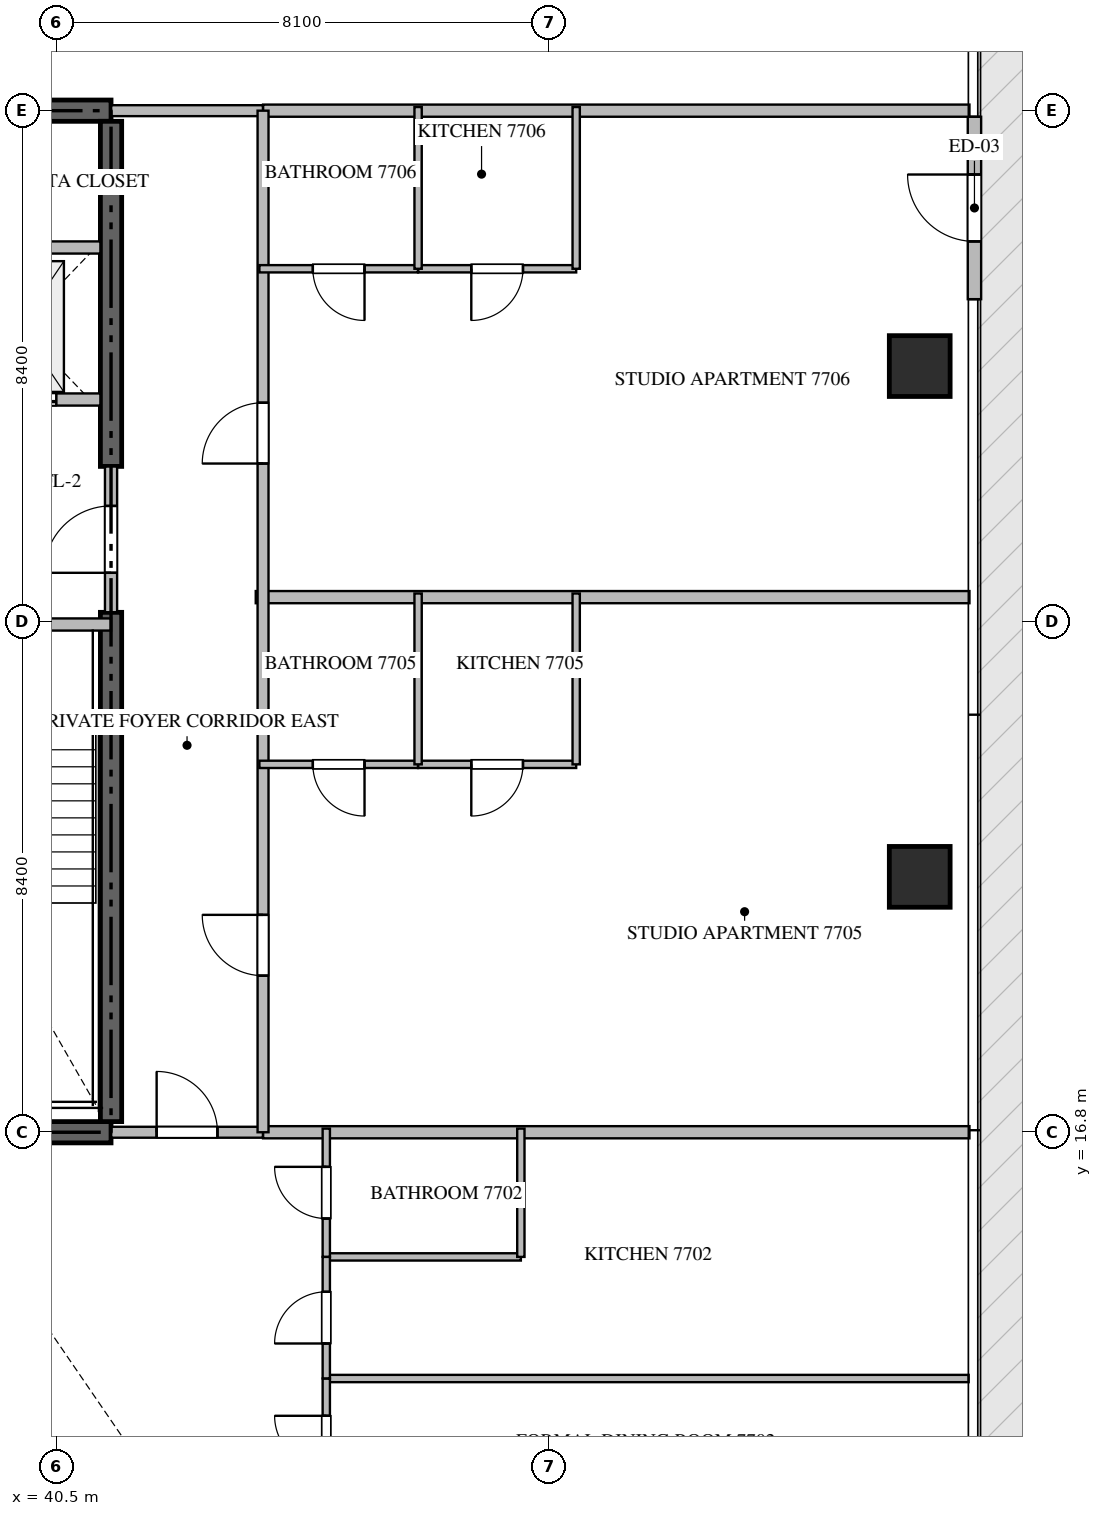
"""IFC4 building model, lengths in metres.
Left out: names, types, materials, properties, quantities, classifications, styles, units other than length and angle.
Written with IfcOpenShell. Run it as: python <this file> out.ifc"""

import sys

from ifc_helpers import new_model, si_unit, direction, frame, frame_2d, origin, origin_2d, place, context, subcontext, project, spatial, rectangle, extrude, source, transform, mapped, element, fill, save


model = new_model("IFC4")
c1 = context("Model", 3, precision=1e-05, world=origin(), true_north=direction((0.0, 1.0)))
c2 = subcontext(c1, "Body", "Model", "MODEL_VIEW")
j1 = project(units=[si_unit("LENGTHUNIT", "METRE"), si_unit("PLANEANGLEUNIT", "RADIAN")], contexts=[c1])
p1 = place(None, origin())
s1 = spatial("IfcSite", under=j1, at=p1, CompositionType="ELEMENT")
p2 = place(p1, origin())
s2 = spatial("IfcBuilding", under=s1, at=p2, CompositionType="ELEMENT")
p3 = place(p2, frame((0.0, 0.0, 309.65)))
s3 = spatial("IfcBuildingStorey", under=s2, at=p3, CompositionType="ELEMENT", Elevation=309.65)
for number, where, z_axis, x_axis in (
    (1, (23.4, 16.8, -0.26), (0.0, 0.0, 1.0), (1.0, 0.0, 0.0)),
    (2, (41.4, 33.6, -0.26), (0.0, 0.0, 1.0), (-1.0, 0.0, 0.0)),
):
    element("IfcWall", number, at=place(p3, frame(where, z_axis=z_axis, x_axis=x_axis)), inside=s3, PredefinedType="SHEAR", context=c2, shape_type="SweptSolid", body=[
        extrude(rectangle(XDim=18.0, YDim=0.35, at=frame_2d((9.0, 0.0))), origin(), (0.0, 0.0, 1.0), 4.048),
    ])
p4 = place(p3, frame((41.4, 16.975, -0.26), z_axis=(0.0, 0.0, 1.0), x_axis=(0.0, 1.0, 0.0)))
e3 = element("IfcWall", 3, at=p4, inside=s3, PredefinedType="SHEAR", context=c2, shape_type="SweptSolid", body=[
    extrude(rectangle(XDim=8.375, YDim=0.35, at=frame_2d((4.188, 0.0))), origin(), (0.0, 0.0, 1.0), 4.048),
])
p5 = place(p3, frame((41.4, 27.75, -0.26), z_axis=(0.0, 0.0, 1.0), x_axis=(0.0, 1.0, 0.0)))
e4 = element("IfcWall", 4, at=p5, inside=s3, PredefinedType="SHEAR", context=c2, shape_type="SweptSolid", body=[
    extrude(rectangle(XDim=5.675, YDim=0.35, at=frame_2d((2.837, 0.0))), origin(), (0.0, 0.0, 1.0), 4.048),
])
m1 = source(origin(), c2, "Body", "SweptSolid", [
    extrude(rectangle(XDim=1.0, YDim=1.0, at=origin_2d()), origin(), (0.0, 0.0, 1.0), 4.05),
])
for number, where, z_axis, x_axis in (
    (5, (54.7, 21.0, -0.26), (0.0, 0.0, 1.0), (1.0, 0.0, 0.0)),
    (6, (54.7, 29.4, -0.26), (0.0, 0.0, 1.0), (1.0, 0.0, 0.0)),
):
    element("IfcColumn", number, at=place(p3, frame(where, z_axis=z_axis, x_axis=x_axis)), inside=s3, PredefinedType="COLUMN", context=c2, shape_type="MappedRepresentation", body=[
        mapped(m1, transform((0.0, 0.0, 0.0), scale=1.0)),
    ])
p6 = place(p3, frame((55.6, 30.5, 0.0), z_axis=(0.0, 0.0, 1.0), x_axis=(0.0, 1.0, 0.0)))
e7 = element("IfcWall", 7, at=p6, inside=s3, PredefinedType="ELEMENTEDWALL", context=c2, shape_type="SweptSolid", body=[
    extrude(rectangle(XDim=3.0, YDim=0.22, at=frame_2d((1.5, 0.0))), origin(), (0.0, 0.0, 1.0), 3.775),
])
p7 = place(p6, frame((0.95, 0.0, 0.0)))
e8 = element("IfcOpeningElement", 8, at=p7, cuts=e7, PredefinedType="OPENING", context=c2, shape_type="SweptSolid", body=[
    extrude(rectangle(XDim=1.1, YDim=2.2, at=frame_2d((0.55, 1.1))), frame((0.0, 0.12, 0.0), z_axis=(0.0, -1.0, 0.0), x_axis=(1.0, 0.0, 0.0)), (0.0, 0.0, 1.0), 0.24),
])
p8 = place(p3, frame((36.95, 25.15, 0.0), z_axis=(0.0, 0.0, 1.0), x_axis=(1.0, 0.0, 0.0)))
e9 = element("IfcWall", 9, at=p8, inside=s3, PredefinedType="STANDARD", context=c2, shape_type="SweptSolid", body=[
    extrude(rectangle(XDim=4.45, YDim=0.2, at=frame_2d((2.225, 0.0))), origin(), (0.0, 0.0, 1.0), 3.79),
])
p9 = place(p8, frame((1.65, 0.0, 0.0)))
e10 = element("IfcOpeningElement", 10, at=p9, cuts=e9, PredefinedType="OPENING", context=c2, shape_type="SweptSolid", body=[
    extrude(rectangle(XDim=1.1, YDim=2.15, at=frame_2d((0.55, 1.075))), frame((0.0, 0.11, 0.0), z_axis=(0.0, -1.0, 0.0), x_axis=(1.0, 0.0, 0.0)), (0.0, 0.0, 1.0), 0.22),
])
p10 = place(p3, frame((38.75, 28.85, 0.0), z_axis=(0.0, 0.0, 1.0), x_axis=(1.0, 0.0, 0.0)))
e11 = element("IfcWall", 11, at=p10, inside=s3, PredefinedType="STANDARD", context=c2, shape_type="SweptSolid", body=[
    extrude(rectangle(XDim=2.475, YDim=0.2, at=frame_2d((1.238, 0.0))), origin(), (0.0, 0.0, 1.0), 3.79),
])
p11 = place(p10, frame((0.55, 0.0, 0.0)))
e12 = element("IfcOpeningElement", 12, at=p11, cuts=e11, PredefinedType="OPENING", context=c2, shape_type="SweptSolid", body=[
    extrude(rectangle(XDim=1.2, YDim=2.2, at=frame_2d((0.6, 1.1))), frame((0.0, 0.11, 0.0), z_axis=(0.0, -1.0, 0.0), x_axis=(1.0, 0.0, 0.0)), (0.0, 0.0, 1.0), 0.22),
])
p12 = place(p3, frame((38.75, 31.35, 0.0), z_axis=(0.0, 0.0, 1.0), x_axis=(1.0, 0.0, 0.0)))
e13 = element("IfcWall", 13, at=p12, inside=s3, PredefinedType="STANDARD", context=c2, shape_type="SweptSolid", body=[
    extrude(rectangle(XDim=2.475, YDim=0.2, at=frame_2d((1.238, 0.0))), origin(), (0.0, 0.0, 1.0), 3.79),
])
p13 = place(p3, frame((41.4, 25.352, 0.0), z_axis=(0.0, 0.0, 1.0), x_axis=(0.0, 1.0, 0.0)))
e14 = element("IfcWall", 14, at=p13, inside=s3, PredefinedType="STANDARD", context=c2, shape_type="SweptSolid", body=[
    extrude(rectangle(XDim=2.396, YDim=0.2, at=frame_2d((1.198, 0.0))), origin(), (0.0, 0.0, 1.0), 3.79),
])
p14 = place(p13, frame((0.648, 0.0, 0.0)))
e15 = element("IfcOpeningElement", 15, at=p14, cuts=e14, PredefinedType="OPENING", context=c2, shape_type="SweptSolid", body=[
    extrude(rectangle(XDim=1.1, YDim=2.15, at=frame_2d((0.55, 1.075))), frame((0.0, 0.11, 0.0), z_axis=(0.0, -1.0, 0.0), x_axis=(1.0, 0.0, 0.0)), (0.0, 0.0, 1.0), 0.22),
])
p15 = place(p3, frame((43.78, 25.6, 0.0), z_axis=(0.0, 0.0, 1.0), x_axis=(1.0, 0.0, 0.0)))
e16 = element("IfcWall", 16, at=p15, inside=s3, PredefinedType="PARTITIONING", context=c2, shape_type="SweptSolid", body=[
    extrude(rectangle(XDim=11.738, YDim=0.2, at=frame_2d((5.869, 0.0))), origin(), (0.0, 0.0, 1.0), 3.79),
])
for number, where, z_axis, x_axis in (
    (17, (43.9, 16.8, 0.0), (0.0, 0.0, 1.0), (1.0, 0.0, 0.0)),
    (18, (43.9, 33.6, 0.0), (0.0, 0.0, 1.0), (1.0, 0.0, 0.0)),
):
    element("IfcWall", number, at=place(p3, frame(where, z_axis=z_axis, x_axis=x_axis)), inside=s3, PredefinedType="PARTITIONING", context=c2, shape_type="SweptSolid", body=[
        extrude(rectangle(XDim=11.618, YDim=0.2, at=frame_2d((5.809, 0.0))), origin(), (0.0, 0.0, 1.0), 3.79),
    ])
p16 = place(p3, frame((41.402, 16.8, 0.0), z_axis=(0.0, 0.0, 1.0), x_axis=(1.0, 0.0, 0.0)))
e19 = element("IfcWall", 19, at=p16, inside=s3, PredefinedType="PARTITIONING", context=c2, shape_type="SweptSolid", body=[
    extrude(rectangle(XDim=2.496, YDim=0.18, at=frame_2d((1.248, 0.0))), origin(), (0.0, 0.0, 1.0), 3.79),
])
p17 = place(p16, frame((0.748, 0.0, 0.0)))
e20 = element("IfcOpeningElement", 20, at=p17, cuts=e19, PredefinedType="OPENING", context=c2, shape_type="SweptSolid", body=[
    extrude(rectangle(XDim=1.0, YDim=2.15, at=frame_2d((0.5, 1.075))), frame((0.0, 0.1, 0.0), z_axis=(0.0, -1.0, 0.0), x_axis=(1.0, 0.0, 0.0)), (0.0, 0.0, 1.0), 0.2),
])
p18 = place(p3, frame((41.402, 33.6, 0.0), z_axis=(0.0, 0.0, 1.0), x_axis=(1.0, 0.0, 0.0)))
e21 = element("IfcWall", 21, at=p18, inside=s3, PredefinedType="PARTITIONING", context=c2, shape_type="SweptSolid", body=[
    extrude(rectangle(XDim=2.496, YDim=0.18, at=frame_2d((1.248, 0.0))), origin(), (0.0, 0.0, 1.0), 3.79),
])
p19 = place(p3, frame((43.9, 16.8, 0.0), z_axis=(0.0, 0.0, 1.0), x_axis=(0.0, 1.0, 0.0)))
e22 = element("IfcWall", 22, at=p19, inside=s3, PredefinedType="PARTITIONING", context=c2, shape_type="SweptSolid", body=[
    extrude(rectangle(XDim=16.8, YDim=0.18, at=frame_2d((8.4, 0.0))), origin(), (0.0, 0.0, 1.0), 3.79),
])
p20 = place(p19, frame((2.575, 0.0, 0.0)))
e23 = element("IfcOpeningElement", 23, at=p20, cuts=e22, PredefinedType="OPENING", context=c2, shape_type="SweptSolid", body=[
    extrude(rectangle(XDim=1.0, YDim=2.15, at=frame_2d((0.5, 1.075))), frame((0.0, 0.1, 0.0), z_axis=(0.0, -1.0, 0.0), x_axis=(1.0, 0.0, 0.0)), (0.0, 0.0, 1.0), 0.2),
])
p21 = place(p19, frame((10.997, 0.0, 0.0)))
e24 = element("IfcOpeningElement", 24, at=p21, cuts=e22, PredefinedType="OPENING", context=c2, shape_type="SweptSolid", body=[
    extrude(rectangle(XDim=1.0, YDim=2.15, at=frame_2d((0.5, 1.075))), frame((0.0, 0.1, 0.0), z_axis=(0.0, -1.0, 0.0), x_axis=(1.0, 0.0, 0.0)), (0.0, 0.0, 1.0), 0.2),
])
p22 = place(p3, frame((44.94, 12.75, 0.0), z_axis=(0.0, 0.0, 1.0), x_axis=(1.0, 0.0, 0.0)))
e25 = element("IfcWall", 25, at=p22, inside=s3, PredefinedType="PARTITIONING", context=c2, shape_type="SweptSolid", body=[
    extrude(rectangle(XDim=10.565, YDim=0.12, at=frame_2d((5.282, 0.0))), origin(), (0.0, 0.0, 1.0), 3.79),
])
p23 = place(p3, frame((44.94, 14.75, 0.0), z_axis=(0.0, 0.0, 1.0), x_axis=(1.0, 0.0, 0.0)))
e26 = element("IfcWall", 26, at=p23, inside=s3, PredefinedType="PARTITIONING", context=c2, shape_type="SweptSolid", body=[
    extrude(rectangle(XDim=3.2, YDim=0.12, at=frame_2d((1.6, 0.0))), origin(), (0.0, 0.0, 1.0), 3.79),
])
p24 = place(p3, frame((48.14, 14.75, 0.0), z_axis=(0.0, 0.0, 1.0), x_axis=(0.0, 1.0, 0.0)))
e27 = element("IfcWall", 27, at=p24, inside=s3, PredefinedType="PARTITIONING", context=c2, shape_type="SweptSolid", body=[
    extrude(rectangle(XDim=2.11, YDim=0.12, at=frame_2d((1.055, 0.0))), origin(), (0.0, 0.0, 1.0), 3.79),
])
p25 = place(p3, frame((44.94, 10.674, 0.0), z_axis=(0.0, 0.0, 1.0), x_axis=(0.0, 1.0, 0.0)))
e28 = element("IfcWall", 28, at=p25, inside=s3, PredefinedType="PARTITIONING", context=c2, shape_type="SweptSolid", body=[
    extrude(rectangle(XDim=2.076, YDim=0.12, at=frame_2d((1.038, 0.0))), origin(), (0.0, 0.0, 1.0), 3.79),
])
p26 = place(p25, frame((0.613, 0.0, 0.0)))
e29 = element("IfcOpeningElement", 29, at=p26, cuts=e28, PredefinedType="OPENING", context=c2, shape_type="SweptSolid", body=[
    extrude(rectangle(XDim=0.85, YDim=2.1, at=frame_2d((0.425, 1.05))), frame((0.0, 0.07, 0.0), z_axis=(0.0, -1.0, 0.0), x_axis=(1.0, 0.0, 0.0)), (0.0, 0.0, 1.0), 0.14),
])
p27 = place(p3, frame((44.94, 12.752, 0.0), z_axis=(0.0, 0.0, 1.0), x_axis=(0.0, 1.0, 0.0)))
e30 = element("IfcWall", 30, at=p27, inside=s3, PredefinedType="PARTITIONING", context=c2, shape_type="SweptSolid", body=[
    extrude(rectangle(XDim=1.998, YDim=0.12, at=frame_2d((0.999, 0.0))), origin(), (0.0, 0.0, 1.0), 3.79),
])
p28 = place(p27, frame((0.574, 0.0, 0.0)))
e31 = element("IfcOpeningElement", 31, at=p28, cuts=e30, PredefinedType="OPENING", context=c2, shape_type="SweptSolid", body=[
    extrude(rectangle(XDim=0.85, YDim=2.1, at=frame_2d((0.425, 1.05))), frame((0.0, 0.07, 0.0), z_axis=(0.0, -1.0, 0.0), x_axis=(1.0, 0.0, 0.0)), (0.0, 0.0, 1.0), 0.14),
])
p29 = place(p3, frame((44.94, 14.752, 0.0), z_axis=(0.0, 0.0, 1.0), x_axis=(0.0, 1.0, 0.0)))
e32 = element("IfcWall", 32, at=p29, inside=s3, PredefinedType="PARTITIONING", context=c2, shape_type="SweptSolid", body=[
    extrude(rectangle(XDim=2.108, YDim=0.12, at=frame_2d((1.054, 0.0))), origin(), (0.0, 0.0, 1.0), 3.79),
])
p30 = place(p29, frame((0.629, 0.0, 0.0)))
e33 = element("IfcOpeningElement", 33, at=p30, cuts=e32, PredefinedType="OPENING", context=c2, shape_type="SweptSolid", body=[
    extrude(rectangle(XDim=0.85, YDim=2.1, at=frame_2d((0.425, 1.05))), frame((0.0, 0.07, 0.0), z_axis=(0.0, -1.0, 0.0), x_axis=(1.0, 0.0, 0.0)), (0.0, 0.0, 1.0), 0.14),
])
p31 = place(p3, frame((49.05, 22.85, 0.0), z_axis=(0.0, 0.0, 1.0), x_axis=(-1.0, 0.0, 0.0)))
e34 = element("IfcWall", 34, at=p31, inside=s3, PredefinedType="PARTITIONING", context=c2, shape_type="SweptSolid", body=[
    extrude(rectangle(XDim=2.6, YDim=0.12, at=frame_2d((1.3, 0.0))), origin(), (0.0, 0.0, 1.0), 3.79),
])
p32 = place(p31, frame((0.875, 0.0, 0.0)))
e35 = element("IfcOpeningElement", 35, at=p32, cuts=e34, PredefinedType="OPENING", context=c2, shape_type="SweptSolid", body=[
    extrude(rectangle(XDim=0.85, YDim=2.1, at=frame_2d((0.425, 1.05))), frame((0.0, 0.07, 0.0), z_axis=(0.0, -1.0, 0.0), x_axis=(1.0, 0.0, 0.0)), (0.0, 0.0, 1.0), 0.14),
])
p33 = place(p3, frame((46.448, 22.85, 0.0), z_axis=(0.0, 0.0, 1.0), x_axis=(-1.0, 0.0, 0.0)))
e36 = element("IfcWall", 36, at=p33, inside=s3, PredefinedType="PARTITIONING", context=c2, shape_type="SweptSolid", body=[
    extrude(rectangle(XDim=2.608, YDim=0.12, at=frame_2d((1.304, 0.0))), origin(), (0.0, 0.0, 1.0), 3.79),
])
p34 = place(p33, frame((0.879, 0.0, 0.0)))
e37 = element("IfcOpeningElement", 37, at=p34, cuts=e36, PredefinedType="OPENING", context=c2, shape_type="SweptSolid", body=[
    extrude(rectangle(XDim=0.85, YDim=2.1, at=frame_2d((0.425, 1.05))), frame((0.0, 0.07, 0.0), z_axis=(0.0, -1.0, 0.0), x_axis=(1.0, 0.0, 0.0)), (0.0, 0.0, 1.0), 0.14),
])
for number, where, z_axis, x_axis in (
    (38, (46.45, 22.85, 0.0), (0.0, 0.0, 1.0), (0.0, 1.0, 0.0)),
    (39, (49.05, 22.85, 0.0), (0.0, 0.0, 1.0), (0.0, 1.0, 0.0)),
):
    element("IfcWall", number, at=place(p3, frame(where, z_axis=z_axis, x_axis=x_axis)), inside=s3, PredefinedType="PARTITIONING", context=c2, shape_type="SweptSolid", body=[
        extrude(rectangle(XDim=2.81, YDim=0.12, at=frame_2d((1.405, 0.0))), origin(), (0.0, 0.0, 1.0), 3.79),
    ])
p35 = place(p3, frame((49.05, 31.0, 0.0), z_axis=(0.0, 0.0, 1.0), x_axis=(-1.0, 0.0, 0.0)))
e40 = element("IfcWall", 40, at=p35, inside=s3, PredefinedType="PARTITIONING", context=c2, shape_type="SweptSolid", body=[
    extrude(rectangle(XDim=2.6, YDim=0.12, at=frame_2d((1.3, 0.0))), origin(), (0.0, 0.0, 1.0), 3.79),
])
p36 = place(p35, frame((0.875, 0.0, 0.0)))
e41 = element("IfcOpeningElement", 41, at=p36, cuts=e40, PredefinedType="OPENING", context=c2, shape_type="SweptSolid", body=[
    extrude(rectangle(XDim=0.85, YDim=2.1, at=frame_2d((0.425, 1.05))), frame((0.0, 0.07, 0.0), z_axis=(0.0, -1.0, 0.0), x_axis=(1.0, 0.0, 0.0)), (0.0, 0.0, 1.0), 0.14),
])
p37 = place(p3, frame((46.448, 31.0, 0.0), z_axis=(0.0, 0.0, 1.0), x_axis=(-1.0, 0.0, 0.0)))
e42 = element("IfcWall", 42, at=p37, inside=s3, PredefinedType="PARTITIONING", context=c2, shape_type="SweptSolid", body=[
    extrude(rectangle(XDim=2.608, YDim=0.12, at=frame_2d((1.304, 0.0))), origin(), (0.0, 0.0, 1.0), 3.79),
])
p38 = place(p37, frame((0.879, 0.0, 0.0)))
e43 = element("IfcOpeningElement", 43, at=p38, cuts=e42, PredefinedType="OPENING", context=c2, shape_type="SweptSolid", body=[
    extrude(rectangle(XDim=0.85, YDim=2.1, at=frame_2d((0.425, 1.05))), frame((0.0, 0.07, 0.0), z_axis=(0.0, -1.0, 0.0), x_axis=(1.0, 0.0, 0.0)), (0.0, 0.0, 1.0), 0.14),
])
for number, where, z_axis, x_axis in (
    (44, (46.45, 31.0, 0.0), (0.0, 0.0, 1.0), (0.0, 1.0, 0.0)),
    (45, (49.05, 31.0, 0.0), (0.0, 0.0, 1.0), (0.0, 1.0, 0.0)),
):
    element("IfcWall", number, at=place(p3, frame(where, z_axis=z_axis, x_axis=x_axis)), inside=s3, PredefinedType="PARTITIONING", context=c2, shape_type="SweptSolid", body=[
        extrude(rectangle(XDim=2.66, YDim=0.12, at=frame_2d((1.33, 0.0))), origin(), (0.0, 0.0, 1.0), 3.79),
    ])
m2 = source(origin(), c2, "Body", "SweptSolid", [
    extrude(rectangle(XDim=1.1, YDim=2.2, at=frame_2d((0.55, 1.1))), frame((0.0, 0.025, 0.0), z_axis=(0.0, -1.0, 0.0), x_axis=(1.0, 0.0, 0.0)), (0.0, 0.0, 1.0), 0.05),
])
p39 = place(p7, origin())
e46 = element("IfcDoor", 46, at=p39, inside=s3, OperationType="SINGLE_SWING_RIGHT", PredefinedType="DOOR", context=c2, shape_type="MappedRepresentation", body=[
    mapped(m2, transform((0.0, 0.0, 0.0), scale=1.0)),
])
fill(e8, e46)
m3 = source(origin(), c2, "Body", "SweptSolid", [
    extrude(rectangle(XDim=1.2, YDim=2.2, at=frame_2d((0.6, 1.1))), frame((0.0, 0.025, 0.0), z_axis=(0.0, -1.0, 0.0), x_axis=(1.0, 0.0, 0.0)), (0.0, 0.0, 1.0), 0.05),
])
p40 = place(p11, origin())
e47 = element("IfcDoor", 47, at=p40, inside=s3, OperationType="DOUBLE_DOOR_SLIDING", PredefinedType="DOOR", context=c2, shape_type="MappedRepresentation", body=[
    mapped(m3, transform((0.0, 0.0, 0.0), scale=1.0)),
])
fill(e12, e47)
m4 = source(origin(), c2, "Body", "SweptSolid", [
    extrude(rectangle(XDim=1.1, YDim=2.15, at=frame_2d((0.55, 1.075))), frame((0.0, 0.025, 0.0), z_axis=(0.0, -1.0, 0.0), x_axis=(1.0, 0.0, 0.0)), (0.0, 0.0, 1.0), 0.05),
])
p41 = place(p14, origin())
e48 = element("IfcDoor", 48, at=p41, inside=s3, OperationType="SINGLE_SWING_LEFT", PredefinedType="DOOR", context=c2, shape_type="MappedRepresentation", body=[
    mapped(m4, transform((0.0, 0.0, 0.0), scale=1.0)),
])
fill(e15, e48)
m5 = source(origin(), c2, "Body", "SweptSolid", [
    extrude(rectangle(XDim=1.0, YDim=2.15, at=frame_2d((0.5, 1.075))), frame((0.0, 0.025, 0.0), z_axis=(0.0, -1.0, 0.0), x_axis=(1.0, 0.0, 0.0)), (0.0, 0.0, 1.0), 0.05),
])
p42 = place(p17, origin())
e49 = element("IfcDoor", 49, at=p42, inside=s3, OperationType="SINGLE_SWING_LEFT", PredefinedType="DOOR", context=c2, shape_type="MappedRepresentation", body=[
    mapped(m5, transform((0.0, 0.0, 0.0), scale=1.0)),
])
fill(e20, e49)
p43 = place(p20, origin())
e50 = element("IfcDoor", 50, at=p43, inside=s3, OperationType="SINGLE_SWING_RIGHT", PredefinedType="DOOR", context=c2, shape_type="MappedRepresentation", body=[
    mapped(m5, transform((0.0, 0.0, 0.0), scale=1.0)),
])
fill(e23, e50)
p44 = place(p21, origin())
e51 = element("IfcDoor", 51, at=p44, inside=s3, OperationType="SINGLE_SWING_LEFT", PredefinedType="DOOR", context=c2, shape_type="MappedRepresentation", body=[
    mapped(m5, transform((0.0, 0.0, 0.0), scale=1.0)),
])
fill(e24, e51)
m6 = source(origin(), c2, "Body", "SweptSolid", [
    extrude(rectangle(XDim=0.85, YDim=2.1, at=frame_2d((0.425, 1.05))), frame((0.0, 0.025, 0.0), z_axis=(0.0, -1.0, 0.0), x_axis=(1.0, 0.0, 0.0)), (0.0, 0.0, 1.0), 0.05),
])
p45 = place(p26, origin())
e52 = element("IfcDoor", 52, at=p45, inside=s3, OperationType="SINGLE_SWING_RIGHT", PredefinedType="DOOR", context=c2, shape_type="MappedRepresentation", body=[
    mapped(m6, transform((0.0, 0.0, 0.0), scale=1.0)),
])
fill(e29, e52)
p46 = place(p28, origin())
e53 = element("IfcDoor", 53, at=p46, inside=s3, OperationType="SINGLE_SWING_LEFT", PredefinedType="DOOR", context=c2, shape_type="MappedRepresentation", body=[
    mapped(m6, transform((0.0, 0.0, 0.0), scale=1.0)),
])
fill(e31, e53)
p47 = place(p30, origin())
e54 = element("IfcDoor", 54, at=p47, inside=s3, OperationType="SINGLE_SWING_RIGHT", PredefinedType="DOOR", context=c2, shape_type="MappedRepresentation", body=[
    mapped(m6, transform((0.0, 0.0, 0.0), scale=1.0)),
])
fill(e33, e54)
p48 = place(p32, origin())
e55 = element("IfcDoor", 55, at=p48, inside=s3, OperationType="SINGLE_SWING_RIGHT", PredefinedType="DOOR", context=c2, shape_type="MappedRepresentation", body=[
    mapped(m6, transform((0.0, 0.0, 0.0), scale=1.0)),
])
fill(e35, e55)
p49 = place(p34, origin())
e56 = element("IfcDoor", 56, at=p49, inside=s3, OperationType="SINGLE_SWING_LEFT", PredefinedType="DOOR", context=c2, shape_type="MappedRepresentation", body=[
    mapped(m6, transform((0.0, 0.0, 0.0), scale=1.0)),
])
fill(e37, e56)
p50 = place(p36, origin())
e57 = element("IfcDoor", 57, at=p50, inside=s3, OperationType="SINGLE_SWING_RIGHT", PredefinedType="DOOR", context=c2, shape_type="MappedRepresentation", body=[
    mapped(m6, transform((0.0, 0.0, 0.0), scale=1.0)),
])
fill(e41, e57)
p51 = place(p38, origin())
e58 = element("IfcDoor", 58, at=p51, inside=s3, OperationType="SINGLE_SWING_LEFT", PredefinedType="DOOR", context=c2, shape_type="MappedRepresentation", body=[
    mapped(m6, transform((0.0, 0.0, 0.0), scale=1.0)),
])
fill(e43, e58)
save(model, sys.argv[1])
